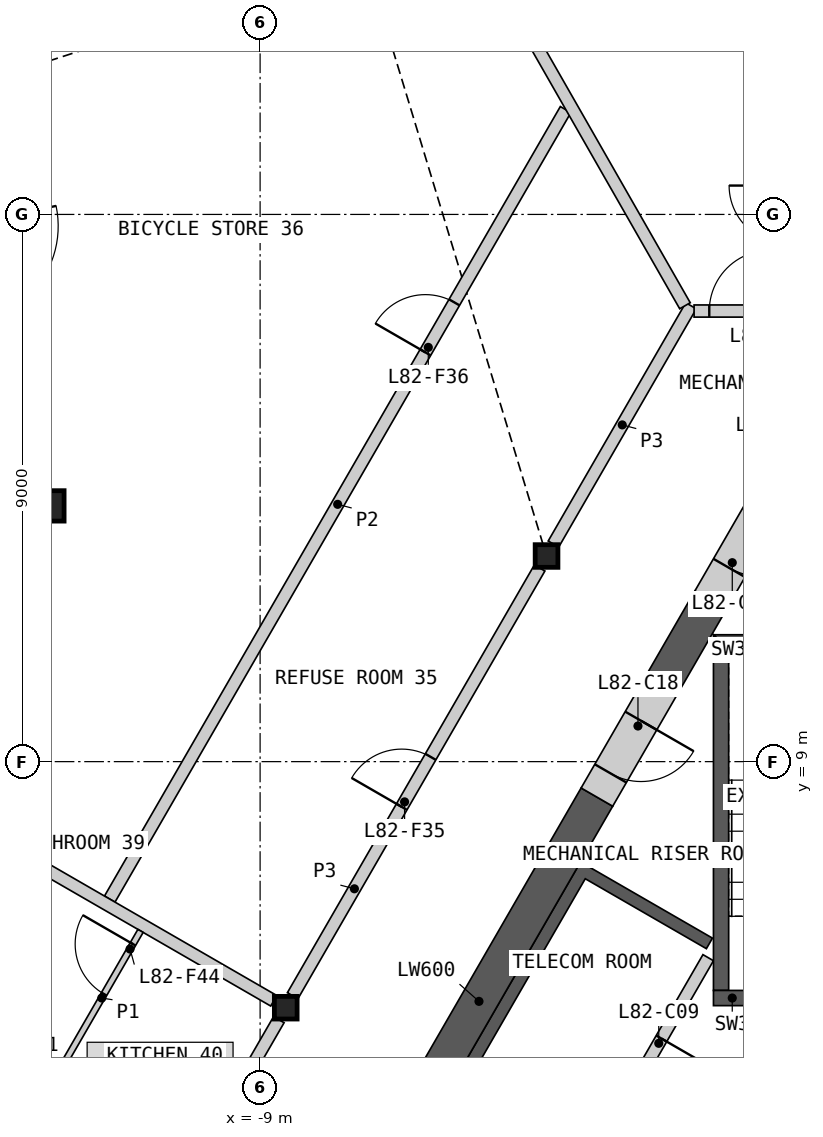
"""IFC4 building model, lengths in metres.
Left out: names, types, materials, properties, quantities, classifications, styles, units other than length and angle.
Written with IfcOpenShell. Run it as: python <this file> out.ifc"""

import sys

from ifc_helpers import new_model, si_unit, direction, frame, frame_2d, origin, origin_2d, place, context, subcontext, project, spatial, polyline, rectangle, hollow_rectangle, i_section, outline, extrude, element, fill, save


model = new_model("IFC4")
c1 = context("Model", 3, precision=1e-05, world=origin(), true_north=direction((0.0, 1.0)))
c2 = subcontext(c1, "Body", "Model", "MODEL_VIEW")
j1 = project(units=[si_unit("LENGTHUNIT", "METRE"), si_unit("PLANEANGLEUNIT", "RADIAN")], contexts=[c1])
p1 = place(None, origin())
s1 = spatial("IfcSite", under=j1, at=p1, CompositionType="ELEMENT")
p2 = place(p1, origin())
s2 = spatial("IfcBuilding", under=s1, at=p2, CompositionType="ELEMENT")
p3 = place(p2, frame((0.0, 0.0, 367.8)))
s3 = spatial("IfcBuildingStorey", under=s2, at=p3, CompositionType="ELEMENT", Elevation=367.8)
p4 = place(p3, frame((-12.474, 13.206, 0.0), z_axis=(0.0, 0.0, 1.0), x_axis=(1.0, 0.0, 0.0)))
e1 = element("IfcColumn", 1, at=p4, inside=s3, PredefinedType="COLUMN", context=c2, shape_type="SweptSolid", body=[
    extrude(hollow_rectangle(XDim=0.5, YDim=0.5, WallThickness=0.03, at=origin_2d()), origin(), (0.0, 0.0, 1.0), 3.4),
])
for number, where, z_axis, x_axis in (
    (2, (-4.289, 12.382, 0.0), (0.0, 0.0, 1.0), (1.0, 0.0, 0.0)),
    (3, (-8.578, 4.953, 0.0), (0.0, 0.0, 1.0), (1.0, 0.0, 0.0)),
):
    element("IfcColumn", number, at=place(p3, frame(where, z_axis=z_axis, x_axis=x_axis)), inside=s3, PredefinedType="COLUMN", context=c2, shape_type="SweptSolid", body=[
        extrude(i_section(OverallWidth=0.374, OverallDepth=0.372, WebThickness=0.016, FlangeThickness=0.026, at=origin_2d()), origin(), (0.0, 0.0, 1.0), 3.4),
    ])
p5 = place(p3, origin())
e4 = element("IfcWall", 4, at=p5, inside=s3, PredefinedType="SHEAR", context=c2, shape_type="SweptSolid", body=[
    extrude(outline(polyline([(-4.96, 0.208), (-7.131, 1.461), (-3.731, 7.35), (-1.561, 6.097), (-1.66, 5.924), (-3.652, 7.074), (-5.752, 3.437), (-3.76, 2.287), (-3.861, 2.113), (-5.852, 3.263), (-6.852, 1.531), (-4.861, 0.381), (-4.96, 0.208)])), origin(), (0.0, 0.0, 1.0), 3.1),
])
p6 = place(p3, frame((-1.631, 5.776, 0.0), z_axis=(0.0, 0.0, 1.0), x_axis=(-0.499992876559, -0.866029516466, 0.0)))
e5 = element("IfcWall", 5, at=p6, inside=s3, PredefinedType="SOLIDWALL", context=c2, shape_type="SweptSolid", body=[
    extrude(rectangle(XDim=6.486, YDim=0.2, at=frame_2d((3.243, 0.0))), origin(), (0.0, 0.0, 1.0), 3.1),
])
p7 = place(p6, frame((1.537, 0.0, 0.0)))
e6 = element("IfcOpeningElement", 6, at=p7, cuts=e5, PredefinedType="OPENING", context=c2, shape_type="SweptSolid", body=[
    extrude(rectangle(XDim=0.9, YDim=2.1, at=frame_2d((0.45, 1.05))), frame((0.0, 0.11, 0.0), z_axis=(0.0, -1.0, 0.0), x_axis=(1.0, 0.0, 0.0)), (0.0, 0.0, 1.0), 0.22),
])
p8 = place(p6, frame((4.837, 0.0, 0.0)))
e7 = element("IfcOpeningElement", 7, at=p8, cuts=e5, PredefinedType="OPENING", context=c2, shape_type="SweptSolid", body=[
    extrude(rectangle(XDim=0.9, YDim=2.1, at=frame_2d((0.45, 1.05))), frame((0.0, 0.11, 0.0), z_axis=(0.0, -1.0, 0.0), x_axis=(1.0, 0.0, 0.0)), (0.0, 0.0, 1.0), 0.22),
])
p9 = place(p3, origin())
e8 = element("IfcWall", 8, at=p9, inside=s3, PredefinedType="SHEAR", context=c2, shape_type="SweptSolid", body=[
    extrude(outline(polyline([(1.544, 11.087), (-1.544, 11.087), (-1.294, 10.837), (1.294, 10.837), (1.544, 11.087)])), origin(), (0.0, 0.0, 1.0), 3.1),
])
p10 = place(p3, origin())
e9 = element("IfcWall", 9, at=p10, inside=s3, PredefinedType="SHEAR", context=c2, shape_type="SweptSolid", body=[
    extrude(outline(polyline([(-1.294, 10.837), (-1.544, 11.087), (-1.544, 5.237), (-1.294, 5.237), (-1.294, 10.837)])), origin(), (0.0, 0.0, 1.0), 3.1),
])
p11 = place(p3, frame((1.544, 5.112, 0.0), z_axis=(0.0, 0.0, 1.0), x_axis=(-1.0, 0.0, 0.0)))
e10 = element("IfcWall", 10, at=p11, inside=s3, PredefinedType="SHEAR", context=c2, shape_type="SweptSolid", body=[
    extrude(rectangle(XDim=3.088, YDim=0.25, at=frame_2d((1.544, 0.0))), origin(), (0.0, 0.0, 1.0), 3.1),
])
p12 = place(p11, frame((0.994, 0.0, 0.0)))
e11 = element("IfcOpeningElement", 11, at=p12, cuts=e10, PredefinedType="OPENING", context=c2, shape_type="SweptSolid", body=[
    extrude(rectangle(XDim=1.1, YDim=2.1, at=frame_2d((0.55, 1.05))), frame((0.0, 0.135, 0.0), z_axis=(0.0, -1.0, 0.0), x_axis=(1.0, 0.0, 0.0)), (0.0, 0.0, 1.0), 0.27),
])
p13 = place(p3, frame((-3.461, 8.417, 0.0), z_axis=(0.0, 0.0, 1.0), x_axis=(-0.50000391502, -0.866023143435, 0.0)))
e12 = element("IfcWall", 12, at=p13, inside=s3, PredefinedType="SHEAR", context=c2, shape_type="SweptSolid", body=[
    extrude(rectangle(XDim=7.759, YDim=0.6, at=frame_2d((3.879, 0.0))), origin(), (0.0, 0.0, 1.0), 3.1),
])
p14 = place(p3, frame((-1.59, 11.658, 0.0), z_axis=(0.0, 0.0, 1.0), x_axis=(-0.500037594623, -0.866003697431, 0.0)))
e13 = element("IfcWall", 13, at=p14, inside=s3, PredefinedType="SHEAR", context=c2, shape_type="SweptSolid", body=[
    extrude(rectangle(XDim=1.542, YDim=0.6, at=frame_2d((0.771, 0.0))), origin(), (0.0, 0.0, 1.0), 3.1),
])
p15 = place(p3, frame((-2.361, 10.322, 0.0), z_axis=(0.0, 0.0, 1.0), x_axis=(-0.499946605688, -0.86605622881, 0.0)))
e14 = element("IfcWall", 14, at=p15, inside=s3, PredefinedType="SHEAR", context=c2, shape_type="SweptSolid", body=[
    extrude(rectangle(XDim=2.2, YDim=0.6, at=frame_2d((1.1, 0.0))), origin(), (0.0, 0.0, 1.0), 3.1),
])
p16 = place(p15, frame((0.75, 0.0, 0.0)))
e15 = element("IfcOpeningElement", 15, at=p16, cuts=e14, PredefinedType="OPENING", context=c2, shape_type="SweptSolid", body=[
    extrude(rectangle(XDim=1.0, YDim=2.1, at=frame_2d((0.5, 1.05))), frame((0.0, 0.31, 0.0), z_axis=(0.0, -1.0, 0.0), x_axis=(1.0, 0.0, 0.0)), (0.0, 0.0, 1.0), 0.62),
])
p17 = place(p3, frame((-0.26, 13.961, 0.0), z_axis=(0.0, 0.0, 1.0), x_axis=(-0.49997936161, -0.866037319036, 0.0)))
e16 = element("IfcWall", 16, at=p17, inside=s3, PredefinedType="SHEAR", context=c2, shape_type="SweptSolid", body=[
    extrude(rectangle(XDim=2.66, YDim=0.6, at=frame_2d((1.33, 0.0))), origin(), (0.0, 0.0, 1.0), 3.1),
])
p18 = place(p17, frame((1.05, 0.0, 0.0)))
e17 = element("IfcOpeningElement", 17, at=p18, cuts=e16, PredefinedType="OPENING", context=c2, shape_type="SweptSolid", body=[
    extrude(rectangle(XDim=1.0, YDim=2.1, at=frame_2d((0.5, 1.05))), frame((0.0, 0.31, 0.0), z_axis=(0.0, -1.0, 0.0), x_axis=(1.0, 0.0, 0.0)), (0.0, 0.0, 1.0), 0.62),
])
p19 = place(p3, frame((-8.465, 5.15, 0.0), z_axis=(0.0, 0.0, 1.0), x_axis=(0.499992155518, 0.866029932751, 0.0)))
e18 = element("IfcWall", 18, at=p19, inside=s3, PredefinedType="PARTITIONING", context=c2, shape_type="SweptSolid", body=[
    extrude(rectangle(XDim=8.123, YDim=0.2, at=frame_2d((4.062, 0.0))), origin(), (0.0, 0.0, 1.0), 3.1),
])
p20 = place(p19, frame((3.587, 0.0, 0.0)))
e19 = element("IfcOpeningElement", 19, at=p20, cuts=e18, PredefinedType="OPENING", context=c2, shape_type="SweptSolid", body=[
    extrude(rectangle(XDim=0.95, YDim=2.1, at=frame_2d((0.475, 1.05))), frame((0.0, 0.11, 0.0), z_axis=(0.0, -1.0, 0.0), x_axis=(1.0, 0.0, 0.0)), (0.0, 0.0, 1.0), 0.22),
])
p21 = place(p3, frame((-12.754, -2.279, 0.0), z_axis=(0.0, 0.0, 1.0), x_axis=(0.500001682468, 0.866024432409, 0.0)))
e20 = element("IfcWall", 20, at=p21, inside=s3, PredefinedType="PARTITIONING", context=c2, shape_type="SweptSolid", body=[
    extrude(rectangle(XDim=8.124, YDim=0.2, at=frame_2d((4.062, 0.0))), origin(), (0.0, 0.0, 1.0), 3.1),
])
p22 = place(p21, frame((3.762, 0.0, 0.0)))
e21 = element("IfcOpeningElement", 21, at=p22, cuts=e20, PredefinedType="OPENING", context=c2, shape_type="SweptSolid", body=[
    extrude(rectangle(XDim=1.0, YDim=2.1, at=frame_2d((0.5, 1.05))), frame((0.0, 0.11, 0.0), z_axis=(0.0, -1.0, 0.0), x_axis=(1.0, 0.0, 0.0)), (0.0, 0.0, 1.0), 0.22),
])
p23 = place(p3, frame((-4.176, 12.579, 0.0), z_axis=(0.0, 0.0, 1.0), x_axis=(0.499974648164, 0.866040040179, 0.0)))
e22 = element("IfcWall", 22, at=p23, inside=s3, PredefinedType="PARTITIONING", context=c2, shape_type="SweptSolid", body=[
    extrude(rectangle(XDim=4.525, YDim=0.2, at=frame_2d((2.263, 0.0))), origin(), (0.0, 0.0, 1.0), 3.1),
])
p24 = place(p3, frame((-1.863, 16.411, 0.0), z_axis=(0.0, 0.0, 1.0), x_axis=(1.0, 0.0, 0.0)))
e23 = element("IfcWall", 23, at=p24, inside=s3, PredefinedType="PARTITIONING", context=c2, shape_type="SweptSolid", body=[
    extrude(rectangle(XDim=3.701, YDim=0.2, at=frame_2d((1.851, 0.0))), origin(), (0.0, 0.0, 1.0), 3.1),
])
p25 = place(p24, frame((0.25, 0.0, 0.0)))
e24 = element("IfcOpeningElement", 24, at=p25, cuts=e23, PredefinedType="OPENING", context=c2, shape_type="SweptSolid", body=[
    extrude(rectangle(XDim=1.0, YDim=2.1, at=frame_2d((0.5, 1.05))), frame((0.0, 0.11, 0.0), z_axis=(0.0, -1.0, 0.0), x_axis=(1.0, 0.0, 0.0)), (0.0, 0.0, 1.0), 0.22),
])
p26 = place(p3, frame((-11.473, 6.74, 0.0), z_axis=(0.0, 0.0, 1.0), x_axis=(0.499993542657, 0.866029131901, 0.0)))
e25 = element("IfcWall", 25, at=p26, inside=s3, PredefinedType="PARTITIONING", context=c2, shape_type="SweptSolid", body=[
    extrude(rectangle(XDim=14.994, YDim=0.2, at=frame_2d((7.497, 0.0))), origin(), (0.0, 0.0, 1.0), 2.33),
])
p27 = place(p26, frame((10.383, 0.0, 0.0)))
e26 = element("IfcOpeningElement", 26, at=p27, cuts=e25, PredefinedType="OPENING", context=c2, shape_type="SweptSolid", body=[
    extrude(rectangle(XDim=0.95, YDim=2.1, at=frame_2d((0.475, 1.05))), frame((0.0, 0.11, 0.0), z_axis=(0.0, -1.0, 0.0), x_axis=(1.0, 0.0, 0.0)), (0.0, 0.0, 1.0), 0.22),
])
p28 = place(p3, frame((-9.362, 29.352, 0.0), z_axis=(0.0, 0.0, 1.0), x_axis=(0.496351997927, -0.868121359116, 0.0)))
e27 = element("IfcWall", 27, at=p28, inside=s3, PredefinedType="PARTITIONING", context=c2, shape_type="SweptSolid", body=[
    extrude(rectangle(XDim=14.807, YDim=0.2, at=frame_2d((7.404, 0.0))), origin(), (0.0, 0.0, 1.0), 2.33),
])
p29 = place(p3, frame((-18.869, 10.894, 0.0), z_axis=(0.0, 0.0, 1.0), x_axis=(0.866023724155, -0.500002909193, 0.0)))
e28 = element("IfcWall", 28, at=p29, inside=s3, PredefinedType="PARTITIONING", context=c2, shape_type="SweptSolid", body=[
    extrude(rectangle(XDim=11.655, YDim=0.2, at=frame_2d((5.827, 0.0))), origin(), (0.0, 0.0, 1.0), 2.33),
])
p30 = place(p3, frame((-15.318, 5.38, 0.0), z_axis=(0.0, 0.0, 1.0), x_axis=(0.866035260786, -0.499982926783, 0.0)))
e29 = element("IfcWall", 29, at=p30, inside=s3, PredefinedType="PARTITIONING", context=c2, shape_type="SweptSolid", body=[
    extrude(rectangle(XDim=5.95, YDim=0.1, at=frame_2d((2.975, 0.0))), origin(), (0.0, 0.0, 1.0), 2.33),
])
p31 = place(p3, frame((-14.735, 5.389, 0.0), z_axis=(0.0, 0.0, 1.0), x_axis=(0.866032775405, -0.499987231761, 0.0)))
e30 = element("IfcWall", 30, at=p31, inside=s3, PredefinedType="PARTITIONING", context=c2, shape_type="SweptSolid", body=[
    extrude(rectangle(XDim=2.9, YDim=0.1, at=frame_2d((1.45, 0.0))), origin(), (0.0, 0.0, 1.0), 2.33),
])
p32 = place(p3, frame((-12.242, 4.008, 0.0), z_axis=(0.0, 0.0, 1.0), x_axis=(0.499948979701, 0.866054858364, 0.0)))
e31 = element("IfcWall", 31, at=p32, inside=s3, PredefinedType="PARTITIONING", context=c2, shape_type="SweptSolid", body=[
    extrude(rectangle(XDim=2.55, YDim=0.1, at=frame_2d((1.275, 0.0))), origin(), (0.0, 0.0, 1.0), 2.33),
])
p33 = place(p32, frame((1.35, 0.0, 0.0)))
e32 = element("IfcOpeningElement", 32, at=p33, cuts=e31, PredefinedType="OPENING", context=c2, shape_type="SweptSolid", body=[
    extrude(rectangle(XDim=0.95, YDim=2.1, at=frame_2d((0.475, 1.05))), frame((0.0, 0.06, 0.0), z_axis=(0.0, -1.0, 0.0), x_axis=(1.0, 0.0, 0.0)), (0.0, 0.0, 1.0), 0.12),
])
p34 = place(p7, origin())
e33 = element("IfcDoor", 33, at=p34, inside=s3, OperationType="SINGLE_SWING_LEFT", PredefinedType="DOOR", context=c2, shape_type="SweptSolid", body=[
    extrude(rectangle(XDim=0.9, YDim=2.1, at=frame_2d((0.45, 1.05))), frame((0.0, 0.025, 0.0), z_axis=(0.0, -1.0, 0.0), x_axis=(1.0, 0.0, 0.0)), (0.0, 0.0, 1.0), 0.05),
])
fill(e6, e33)
p35 = place(p16, origin())
e34 = element("IfcDoor", 34, at=p35, inside=s3, OperationType="SINGLE_SWING_LEFT", PredefinedType="DOOR", context=c2, shape_type="SweptSolid", body=[
    extrude(rectangle(XDim=1.0, YDim=2.1, at=frame_2d((0.5, 1.05))), frame((0.0, 0.055, 0.0), z_axis=(0.0, -1.0, 0.0), x_axis=(1.0, 0.0, 0.0)), (0.0, 0.0, 1.0), 0.05),
])
fill(e15, e34)
p36 = place(p18, origin())
e35 = element("IfcDoor", 35, at=p36, inside=s3, OperationType="SINGLE_SWING_LEFT", PredefinedType="DOOR", context=c2, shape_type="SweptSolid", body=[
    extrude(rectangle(XDim=1.0, YDim=2.1, at=frame_2d((0.5, 1.05))), frame((0.0, 0.055, 0.0), z_axis=(0.0, -1.0, 0.0), x_axis=(1.0, 0.0, 0.0)), (0.0, 0.0, 1.0), 0.05),
])
fill(e17, e35)
p37 = place(p25, origin())
e36 = element("IfcDoor", 36, at=p37, inside=s3, OperationType="SINGLE_SWING_RIGHT", PredefinedType="DOOR", context=c2, shape_type="SweptSolid", body=[
    extrude(rectangle(XDim=1.0, YDim=2.1, at=frame_2d((0.5, 1.05))), frame((0.0, 0.025, 0.0), z_axis=(0.0, -1.0, 0.0), x_axis=(1.0, 0.0, 0.0)), (0.0, 0.0, 1.0), 0.05),
])
fill(e24, e36)
p38 = place(p20, origin())
e37 = element("IfcDoor", 37, at=p38, inside=s3, OperationType="SINGLE_SWING_LEFT", PredefinedType="DOOR", context=c2, shape_type="SweptSolid", body=[
    extrude(rectangle(XDim=0.95, YDim=2.1, at=frame_2d((0.475, 1.05))), frame((0.0, 0.025, 0.0), z_axis=(0.0, -1.0, 0.0), x_axis=(1.0, 0.0, 0.0)), (0.0, 0.0, 1.0), 0.05),
])
fill(e19, e37)
p39 = place(p27, origin())
e38 = element("IfcDoor", 38, at=p39, inside=s3, OperationType="SINGLE_SWING_LEFT", PredefinedType="DOOR", context=c2, shape_type="SweptSolid", body=[
    extrude(rectangle(XDim=0.95, YDim=2.1, at=frame_2d((0.475, 1.05))), frame((0.0, 0.025, 0.0), z_axis=(0.0, -1.0, 0.0), x_axis=(1.0, 0.0, 0.0)), (0.0, 0.0, 1.0), 0.05),
])
fill(e26, e38)
p40 = place(p33, origin())
e39 = element("IfcDoor", 39, at=p40, inside=s3, OperationType="SINGLE_SWING_RIGHT", PredefinedType="DOOR", context=c2, shape_type="SweptSolid", body=[
    extrude(rectangle(XDim=0.95, YDim=2.1, at=frame_2d((0.475, 1.05))), frame((0.0, 0.025, 0.0), z_axis=(0.0, -1.0, 0.0), x_axis=(1.0, 0.0, 0.0)), (0.0, 0.0, 1.0), 0.05),
])
fill(e32, e39)
save(model, sys.argv[1])
